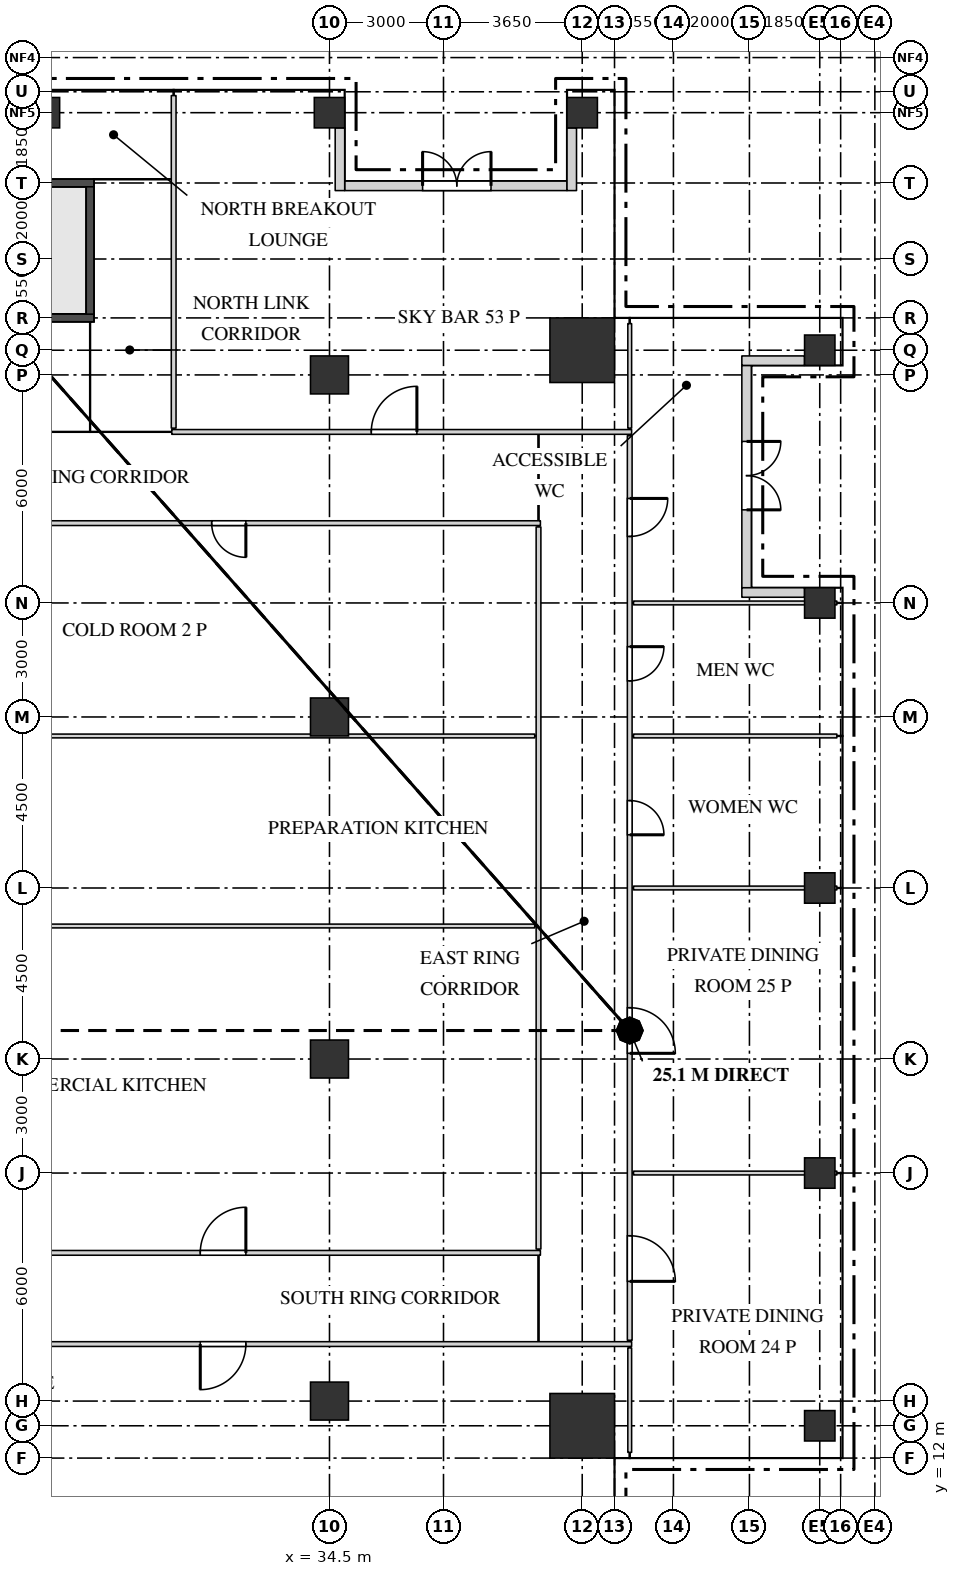
"""IFC4 building model, lengths in metres.
Left out: names, types, materials, properties, quantities, classifications, styles, units other than length and angle.
Written with IfcOpenShell. Run it as: python <this file> out.ifc"""

import sys

from ifc_helpers import new_model, si_unit, direction, frame, frame_2d, origin, origin_2d, place, context, subcontext, project, spatial, rectangle, extrude, source, transform, mapped, element, fill, save


model = new_model("IFC4")
c1 = context("Model", 3, precision=1e-05, world=origin(), true_north=direction((0.0, 1.0)))
c2 = subcontext(c1, "Body", "Model", "MODEL_VIEW")
j1 = project(units=[si_unit("LENGTHUNIT", "METRE"), si_unit("PLANEANGLEUNIT", "RADIAN")], contexts=[c1])
p1 = place(None, origin())
s1 = spatial("IfcSite", under=j1, at=p1, CompositionType="ELEMENT")
p2 = place(p1, origin())
s2 = spatial("IfcBuilding", under=s1, at=p2, CompositionType="ELEMENT")
p3 = place(p2, frame((0.0, 0.0, 306.2)))
s3 = spatial("IfcBuildingStorey", under=s2, at=p3, CompositionType="ELEMENT", Elevation=306.2)
m1 = source(origin(), c2, "Body", "SweptSolid", [
    extrude(rectangle(XDim=7.1, YDim=0.2, at=frame_2d((3.55, 0.0))), origin(), (0.0, 0.0, 1.0), 3.75),
])
p4 = place(p3, frame((21.2, 45.55, 0.0), z_axis=(0.0, 0.0, 1.0), x_axis=(1.0, 0.0, 0.0)))
e1 = element("IfcWall", 1, at=p4, inside=s3, PredefinedType="SHEAR", context=c2, shape_type="MappedRepresentation", body=[
    mapped(m1, transform((0.0, 0.0, 0.0))),
])
m2 = source(origin(), c2, "Body", "SweptSolid", [
    extrude(rectangle(XDim=1.2, YDim=2.1, at=frame_2d((0.6, 1.05))), frame((0.0, 0.11, 0.0), z_axis=(0.0, -1.0, 0.0), x_axis=(1.0, 0.0, 0.0)), (0.0, 0.0, 1.0), 0.22),
])
p5 = place(p4, frame((0.15, 0.0, 0.0)))
e2 = element("IfcOpeningElement", 2, at=p5, cuts=e1, PredefinedType="OPENING", context=c2, shape_type="MappedRepresentation", body=[
    mapped(m2, transform((0.0, 0.0, 0.0))),
])
p6 = place(p3, frame((21.2, 42.0, 0.0), z_axis=(0.0, 0.0, 1.0), x_axis=(1.0, 0.0, 0.0)))
e3 = element("IfcWall", 3, at=p6, inside=s3, PredefinedType="SHEAR", context=c2, shape_type="MappedRepresentation", body=[
    mapped(m1, transform((0.0, 0.0, 0.0))),
])
m3 = source(origin(), c2, "Body", "SweptSolid", [
    extrude(rectangle(XDim=3.35, YDim=0.2, at=frame_2d((1.675, 0.0))), origin(), (0.0, 0.0, 1.0), 3.75),
])
p7 = place(p3, frame((28.2, 42.1, 0.0), z_axis=(0.0, 0.0, 1.0), x_axis=(0.0, 1.0, 0.0)))
e4 = element("IfcWall", 4, at=p7, inside=s3, PredefinedType="SHEAR", context=c2, shape_type="MappedRepresentation", body=[
    mapped(m3, transform((0.0, 0.0, 0.0))),
])
m4 = source(origin(), c2, "Body", "SweptSolid", [
    extrude(rectangle(XDim=1.7, YDim=1.7, at=origin_2d()), origin(), (0.0, 0.0, 1.0), 3.75),
])
for number, where, z_axis, x_axis in (
    (5, (41.15, 41.15, 0.0), (0.0, 0.0, 1.0), (1.0, 0.0, 0.0)),
    (6, (41.15, 12.85, 0.0), (0.0, 0.0, 1.0), (1.0, 0.0, 0.0)),
):
    element("IfcColumn", number, at=place(p3, frame(where, z_axis=z_axis, x_axis=x_axis)), inside=s3, PredefinedType="COLUMN", context=c2, shape_type="MappedRepresentation", body=[
        mapped(m4, transform((0.0, 0.0, 0.0))),
    ])
m5 = source(origin(), c2, "Body", "SweptSolid", [
    extrude(rectangle(XDim=0.8, YDim=0.8, at=origin_2d()), origin(), (0.0, 0.0, 1.0), 3.75),
])
for number, where, z_axis, x_axis in (
    (7, (47.4, 12.85, 0.0), (0.0, 0.0, 1.0), (1.0, 0.0, 0.0)),
    (8, (47.4, 19.5, 0.0), (0.0, 0.0, 1.0), (1.0, 0.0, 0.0)),
    (9, (47.4, 27.0, 0.0), (0.0, 0.0, 1.0), (1.0, 0.0, 0.0)),
    (10, (47.4, 34.5, 0.0), (0.0, 0.0, 1.0), (1.0, 0.0, 0.0)),
    (11, (47.4, 41.15, 0.0), (0.0, 0.0, 1.0), (1.0, 0.0, 0.0)),
    (12, (27.0, 47.4, 0.0), (0.0, 0.0, 1.0), (1.0, 0.0, 0.0)),
    (13, (34.5, 47.4, 0.0), (0.0, 0.0, 1.0), (1.0, 0.0, 0.0)),
    (14, (41.15, 47.4, 0.0), (0.0, 0.0, 1.0), (1.0, 0.0, 0.0)),
):
    element("IfcColumn", number, at=place(p3, frame(where, z_axis=z_axis, x_axis=x_axis)), inside=s3, PredefinedType="COLUMN", context=c2, shape_type="MappedRepresentation", body=[
        mapped(m5, transform((0.0, 0.0, 0.0))),
    ])
m6 = source(origin(), c2, "Body", "SweptSolid", [
    extrude(rectangle(XDim=1.0, YDim=1.0, at=origin_2d()), origin(), (0.0, 0.0, 1.0), 3.75),
])
for number, where, z_axis, x_axis in (
    (15, (34.5, 13.5, 0.0), (0.0, 0.0, 1.0), (1.0, 0.0, 0.0)),
    (16, (34.5, 22.5, 0.0), (0.0, 0.0, 1.0), (1.0, 0.0, 0.0)),
    (17, (34.5, 31.5, 0.0), (0.0, 0.0, 1.0), (1.0, 0.0, 0.0)),
    (18, (34.5, 40.5, 0.0), (0.0, 0.0, 1.0), (1.0, 0.0, 0.0)),
):
    element("IfcColumn", number, at=place(p3, frame(where, z_axis=z_axis, x_axis=x_axis)), inside=s3, PredefinedType="COLUMN", context=c2, shape_type="MappedRepresentation", body=[
        mapped(m6, transform((0.0, 0.0, 0.0))),
    ])
m7 = source(origin(), c2, "Body", "SweptSolid", [
    extrude(rectangle(XDim=5.85, YDim=0.25, at=frame_2d((2.925, 0.0))), origin(), (0.0, 0.0, 1.0), 3.75),
])
p8 = place(p3, frame((45.475, 34.9, 0.0), z_axis=(0.0, 0.0, 1.0), x_axis=(0.0, 1.0, 0.0)))
e19 = element("IfcWall", 19, at=p8, inside=s3, PredefinedType="SOLIDWALL", context=c2, shape_type="MappedRepresentation", body=[
    mapped(m7, transform((0.0, 0.0, 0.0))),
])
m8 = source(origin(), c2, "Body", "SweptSolid", [
    extrude(rectangle(XDim=1.4, YDim=2.4, at=frame_2d((0.7, 1.2))), frame((0.0, 0.135, 0.0), z_axis=(0.0, -1.0, 0.0), x_axis=(1.0, 0.0, 0.0)), (0.0, 0.0, 1.0), 0.27),
])
p9 = place(p8, frame((0.35, 0.0, 0.0)))
e20 = element("IfcOpeningElement", 20, at=p9, cuts=e19, PredefinedType="OPENING", context=c2, shape_type="MappedRepresentation", body=[
    mapped(m8, transform((0.0, 0.0, 0.0))),
])
p10 = place(p8, frame((4.15, 0.0, 0.0)))
e21 = element("IfcOpeningElement", 21, at=p10, cuts=e19, PredefinedType="OPENING", context=c2, shape_type="MappedRepresentation", body=[
    mapped(m8, transform((0.0, 0.0, 0.0))),
])
m9 = source(origin(), c2, "Body", "SweptSolid", [
    extrude(rectangle(XDim=1.8, YDim=2.4, at=frame_2d((0.9, 1.2))), frame((0.0, 0.135, 0.0), z_axis=(0.0, -1.0, 0.0), x_axis=(1.0, 0.0, 0.0)), (0.0, 0.0, 1.0), 0.27),
])
p11 = place(p8, frame((2.05, 0.0, 0.0)))
e22 = element("IfcOpeningElement", 22, at=p11, cuts=e19, PredefinedType="OPENING", context=c2, shape_type="MappedRepresentation", body=[
    mapped(m9, transform((0.0, 0.0, 0.0))),
])
m10 = source(origin(), c2, "Body", "SweptSolid", [
    extrude(rectangle(XDim=1.65, YDim=0.25, at=frame_2d((0.825, 0.0))), origin(), (0.0, 0.0, 1.0), 3.45),
])
for number, where, z_axis, x_axis in (
    (23, (47.0, 34.775, 0.0), (0.0, 0.0, 1.0), (-1.0, 0.0, 0.0)),
    (24, (47.0, 40.875, 0.0), (0.0, 0.0, 1.0), (-1.0, 0.0, 0.0)),
):
    element("IfcWall", number, at=place(p3, frame(where, z_axis=z_axis, x_axis=x_axis)), inside=s3, PredefinedType="SOLIDWALL", context=c2, shape_type="MappedRepresentation", body=[
        mapped(m10, transform((0.0, 0.0, 0.0))),
    ])
p12 = place(p3, frame((34.9, 45.475, 0.0), z_axis=(0.0, 0.0, 1.0), x_axis=(1.0, 0.0, 0.0)))
e25 = element("IfcWall", 25, at=p12, inside=s3, PredefinedType="SOLIDWALL", context=c2, shape_type="MappedRepresentation", body=[
    mapped(m7, transform((0.0, 0.0, 0.0))),
])
p13 = place(p12, frame((0.35, 0.0, 0.0)))
e26 = element("IfcOpeningElement", 26, at=p13, cuts=e25, PredefinedType="OPENING", context=c2, shape_type="MappedRepresentation", body=[
    mapped(m8, transform((0.0, 0.0, 0.0))),
])
p14 = place(p12, frame((4.15, 0.0, 0.0)))
e27 = element("IfcOpeningElement", 27, at=p14, cuts=e25, PredefinedType="OPENING", context=c2, shape_type="MappedRepresentation", body=[
    mapped(m8, transform((0.0, 0.0, 0.0))),
])
p15 = place(p12, frame((2.05, 0.0, 0.0)))
e28 = element("IfcOpeningElement", 28, at=p15, cuts=e25, PredefinedType="OPENING", context=c2, shape_type="MappedRepresentation", body=[
    mapped(m9, transform((0.0, 0.0, 0.0))),
])
for number, where, z_axis, x_axis in (
    (29, (34.775, 47.0, 0.0), (0.0, 0.0, 1.0), (0.0, -1.0, 0.0)),
    (30, (40.875, 47.0, 0.0), (0.0, 0.0, 1.0), (0.0, -1.0, 0.0)),
):
    element("IfcWall", number, at=place(p3, frame(where, z_axis=z_axis, x_axis=x_axis)), inside=s3, PredefinedType="SOLIDWALL", context=c2, shape_type="MappedRepresentation", body=[
        mapped(m10, transform((0.0, 0.0, 0.0))),
    ])
m11 = source(origin(), c2, "Body", "SweptSolid", [
    extrude(rectangle(XDim=2.75, YDim=0.1, at=frame_2d((1.375, 0.0))), origin(), (0.0, 0.0, 1.0), 3.8),
])
p16 = place(p3, frame((42.4, 12.15, 0.0), z_axis=(0.0, 0.0, 1.0), x_axis=(0.0, 1.0, 0.0)))
e31 = element("IfcWall", 31, at=p16, inside=s3, PredefinedType="PARTITIONING", context=c2, shape_type="MappedRepresentation", body=[
    mapped(m11, transform((0.0, 0.0, 0.0))),
])
m12 = source(origin(), c2, "Body", "SweptSolid", [
    extrude(rectangle(XDim=19.1, YDim=0.125, at=frame_2d((9.55, 0.0))), origin(), (0.0, 0.0, 1.0), 3.8),
])
p17 = place(p3, frame((23.35, 15.0, 0.0), z_axis=(0.0, 0.0, 1.0), x_axis=(1.0, 0.0, 0.0)))
e32 = element("IfcWall", 32, at=p17, inside=s3, PredefinedType="PARTITIONING", context=c2, shape_type="MappedRepresentation", body=[
    mapped(m12, transform((0.0, 0.0, 0.0))),
])
m13 = source(origin(), c2, "Body", "SweptSolid", [
    extrude(rectangle(XDim=1.2, YDim=2.1, at=frame_2d((0.6, 1.05))), frame((0.0, 0.073, 0.0), z_axis=(0.0, -1.0, 0.0), x_axis=(1.0, 0.0, 0.0)), (0.0, 0.0, 1.0), 0.145),
])
p18 = place(p17, frame((7.75, 0.0, 0.0)))
e33 = element("IfcOpeningElement", 33, at=p18, cuts=e32, PredefinedType="OPENING", context=c2, shape_type="MappedRepresentation", body=[
    mapped(m13, transform((0.0, 0.0, 0.0))),
])
m14 = source(origin(), c2, "Body", "SweptSolid", [
    extrude(rectangle(XDim=23.8, YDim=0.125, at=frame_2d((11.9, 0.0))), origin(), (0.0, 0.0, 1.0), 3.8),
])
p19 = place(p3, frame((42.4, 15.1, 0.0), z_axis=(0.0, 0.0, 1.0), x_axis=(0.0, 1.0, 0.0)))
e34 = element("IfcWall", 34, at=p19, inside=s3, PredefinedType="PARTITIONING", context=c2, shape_type="MappedRepresentation", body=[
    mapped(m14, transform((0.0, 0.0, 0.0))),
])
p20 = place(p19, frame((1.55, 0.0, 0.0)))
e35 = element("IfcOpeningElement", 35, at=p20, cuts=e34, PredefinedType="OPENING", context=c2, shape_type="MappedRepresentation", body=[
    mapped(m13, transform((0.0, 0.0, 0.0))),
])
p21 = place(p19, frame((7.55, 0.0, 0.0)))
e36 = element("IfcOpeningElement", 36, at=p21, cuts=e34, PredefinedType="OPENING", context=c2, shape_type="MappedRepresentation", body=[
    mapped(m13, transform((0.0, 0.0, 0.0))),
])
m15 = source(origin(), c2, "Body", "SweptSolid", [
    extrude(rectangle(XDim=0.9, YDim=2.1, at=frame_2d((0.45, 1.05))), frame((0.0, 0.073, 0.0), z_axis=(0.0, -1.0, 0.0), x_axis=(1.0, 0.0, 0.0)), (0.0, 0.0, 1.0), 0.145),
])
p22 = place(p19, frame((13.3, 0.0, 0.0)))
e37 = element("IfcOpeningElement", 37, at=p22, cuts=e34, PredefinedType="OPENING", context=c2, shape_type="MappedRepresentation", body=[
    mapped(m15, transform((0.0, 0.0, 0.0))),
])
p23 = place(p19, frame((17.35, 0.0, 0.0)))
e38 = element("IfcOpeningElement", 38, at=p23, cuts=e34, PredefinedType="OPENING", context=c2, shape_type="MappedRepresentation", body=[
    mapped(m15, transform((0.0, 0.0, 0.0))),
])
m16 = source(origin(), c2, "Body", "SweptSolid", [
    extrude(rectangle(XDim=1.0, YDim=2.1, at=frame_2d((0.5, 1.05))), frame((0.0, 0.073, 0.0), z_axis=(0.0, -1.0, 0.0), x_axis=(1.0, 0.0, 0.0)), (0.0, 0.0, 1.0), 0.145),
])
p24 = place(p19, frame((21.15, 0.0, 0.0)))
e39 = element("IfcOpeningElement", 39, at=p24, cuts=e34, PredefinedType="OPENING", context=c2, shape_type="MappedRepresentation", body=[
    mapped(m16, transform((0.0, 0.0, 0.0))),
])
m17 = source(origin(), c2, "Body", "SweptSolid", [
    extrude(rectangle(XDim=16.7, YDim=0.125, at=frame_2d((8.35, 0.0))), origin(), (0.0, 0.0, 1.0), 3.8),
])
p25 = place(p3, frame((23.35, 17.4, 0.0), z_axis=(0.0, 0.0, 1.0), x_axis=(1.0, 0.0, 0.0)))
e40 = element("IfcWall", 40, at=p25, inside=s3, PredefinedType="PARTITIONING", context=c2, shape_type="MappedRepresentation", body=[
    mapped(m17, transform((0.0, 0.0, 0.0))),
])
p26 = place(p25, frame((7.75, 0.0, 0.0)))
e41 = element("IfcOpeningElement", 41, at=p26, cuts=e40, PredefinedType="OPENING", context=c2, shape_type="MappedRepresentation", body=[
    mapped(m13, transform((0.0, 0.0, 0.0))),
])
m18 = source(origin(), c2, "Body", "SweptSolid", [
    extrude(rectangle(XDim=19.0, YDim=0.125, at=frame_2d((9.5, 0.0))), origin(), (0.0, 0.0, 1.0), 3.8),
])
p27 = place(p3, frame((40.0, 17.5, 0.0), z_axis=(0.0, 0.0, 1.0), x_axis=(0.0, 1.0, 0.0)))
e42 = element("IfcWall", 42, at=p27, inside=s3, PredefinedType="PARTITIONING", context=c2, shape_type="MappedRepresentation", body=[
    mapped(m18, transform((0.0, 0.0, 0.0))),
])
m19 = source(origin(), c2, "Body", "SweptSolid", [
    extrude(rectangle(XDim=5.35, YDim=0.1, at=frame_2d((2.675, 0.0))), origin(), (0.0, 0.0, 1.0), 3.8),
])
p28 = place(p3, frame((42.5, 19.5, 0.0), z_axis=(0.0, 0.0, 1.0), x_axis=(1.0, 0.0, 0.0)))
e43 = element("IfcWall", 43, at=p28, inside=s3, PredefinedType="PARTITIONING", context=c2, shape_type="MappedRepresentation", body=[
    mapped(m19, transform((0.0, 0.0, 0.0))),
])
m20 = source(origin(), c2, "Body", "SweptSolid", [
    extrude(rectangle(XDim=16.4, YDim=0.1, at=frame_2d((8.2, 0.0))), origin(), (0.0, 0.0, 1.0), 3.8),
])
p29 = place(p3, frame((23.5, 26.0, 0.0), z_axis=(0.0, 0.0, 1.0), x_axis=(1.0, 0.0, 0.0)))
e44 = element("IfcWall", 44, at=p29, inside=s3, PredefinedType="PARTITIONING", context=c2, shape_type="MappedRepresentation", body=[
    mapped(m20, transform((0.0, 0.0, 0.0))),
])
p30 = place(p3, frame((42.5, 27.0, 0.0), z_axis=(0.0, 0.0, 1.0), x_axis=(1.0, 0.0, 0.0)))
e45 = element("IfcWall", 45, at=p30, inside=s3, PredefinedType="PARTITIONING", context=c2, shape_type="MappedRepresentation", body=[
    mapped(m19, transform((0.0, 0.0, 0.0))),
])
p31 = place(p3, frame((23.5, 31.0, 0.0), z_axis=(0.0, 0.0, 1.0), x_axis=(1.0, 0.0, 0.0)))
e46 = element("IfcWall", 46, at=p31, inside=s3, PredefinedType="PARTITIONING", context=c2, shape_type="MappedRepresentation", body=[
    mapped(m20, transform((0.0, 0.0, 0.0))),
])
for number, where, z_axis, x_axis in (
    (47, (42.5, 31.0, 0.0), (0.0, 0.0, 1.0), (1.0, 0.0, 0.0)),
    (48, (42.5, 34.5, 0.0), (0.0, 0.0, 1.0), (1.0, 0.0, 0.0)),
):
    element("IfcWall", number, at=place(p3, frame(where, z_axis=z_axis, x_axis=x_axis)), inside=s3, PredefinedType="PARTITIONING", context=c2, shape_type="MappedRepresentation", body=[
        mapped(m19, transform((0.0, 0.0, 0.0))),
    ])
p32 = place(p3, frame((23.35, 36.6, 0.0), z_axis=(0.0, 0.0, 1.0), x_axis=(1.0, 0.0, 0.0)))
e49 = element("IfcWall", 49, at=p32, inside=s3, PredefinedType="PARTITIONING", context=c2, shape_type="MappedRepresentation", body=[
    mapped(m17, transform((0.0, 0.0, 0.0))),
])
p33 = place(p32, frame((8.05, 0.0, 0.0)))
e50 = element("IfcOpeningElement", 50, at=p33, cuts=e49, PredefinedType="OPENING", context=c2, shape_type="MappedRepresentation", body=[
    mapped(m15, transform((0.0, 0.0, 0.0))),
])
m21 = source(origin(), c2, "Body", "SweptSolid", [
    extrude(rectangle(XDim=12.1, YDim=0.125, at=frame_2d((6.05, 0.0))), origin(), (0.0, 0.0, 1.0), 3.8),
])
p34 = place(p3, frame((30.35, 39.0, 0.0), z_axis=(0.0, 0.0, 1.0), x_axis=(1.0, 0.0, 0.0)))
e51 = element("IfcWall", 51, at=p34, inside=s3, PredefinedType="PARTITIONING", context=c2, shape_type="MappedRepresentation", body=[
    mapped(m21, transform((0.0, 0.0, 0.0))),
])
p35 = place(p34, frame((5.25, 0.0, 0.0)))
e52 = element("IfcOpeningElement", 52, at=p35, cuts=e51, PredefinedType="OPENING", context=c2, shape_type="MappedRepresentation", body=[
    mapped(m13, transform((0.0, 0.0, 0.0))),
])
m22 = source(origin(), c2, "Body", "SweptSolid", [
    extrude(rectangle(XDim=8.75, YDim=0.125, at=frame_2d((4.375, 0.0))), origin(), (0.0, 0.0, 1.0), 3.8),
])
p36 = place(p3, frame((30.4, 39.1, 0.0), z_axis=(0.0, 0.0, 1.0), x_axis=(0.0, 1.0, 0.0)))
e53 = element("IfcWall", 53, at=p36, inside=s3, PredefinedType="PARTITIONING", context=c2, shape_type="MappedRepresentation", body=[
    mapped(m22, transform((0.0, 0.0, 0.0))),
])
p37 = place(p3, frame((42.4, 39.1, 0.0), z_axis=(0.0, 0.0, 1.0), x_axis=(0.0, 1.0, 0.0)))
e54 = element("IfcWall", 54, at=p37, inside=s3, PredefinedType="PARTITIONING", context=c2, shape_type="MappedRepresentation", body=[
    mapped(m11, transform((0.0, 0.0, 0.0))),
])
m23 = source(origin(), c2, "Body", "SweptSolid", [
    extrude(rectangle(XDim=1.4, YDim=2.4, at=frame_2d((0.7, 1.2))), frame((0.0, 0.03, 0.0), z_axis=(0.0, -1.0, 0.0), x_axis=(1.0, 0.0, 0.0)), (0.0, 0.0, 1.0), 0.06),
])
p38 = place(p9, origin())
e55 = element("IfcWindow", 55, at=p38, inside=s3, PartitioningType="SINGLE_PANEL", PredefinedType="WINDOW", context=c2, shape_type="MappedRepresentation", body=[
    mapped(m23, transform((0.0, 0.0, 0.0))),
])
fill(e20, e55)
p39 = place(p10, origin())
e56 = element("IfcWindow", 56, at=p39, inside=s3, PartitioningType="SINGLE_PANEL", PredefinedType="WINDOW", context=c2, shape_type="MappedRepresentation", body=[
    mapped(m23, transform((0.0, 0.0, 0.0))),
])
fill(e21, e56)
m24 = source(origin(), c2, "Body", "SweptSolid", [
    extrude(rectangle(XDim=1.8, YDim=2.4, at=frame_2d((0.9, 1.2))), frame((0.0, 0.025, 0.0), z_axis=(0.0, -1.0, 0.0), x_axis=(1.0, 0.0, 0.0)), (0.0, 0.0, 1.0), 0.05),
])
p40 = place(p11, origin())
e57 = element("IfcDoor", 57, at=p40, inside=s3, OperationType="DOUBLE_DOOR_DOUBLE_SWING", PredefinedType="DOOR", context=c2, shape_type="MappedRepresentation", body=[
    mapped(m24, transform((0.0, 0.0, 0.0))),
])
fill(e22, e57)
p41 = place(p13, origin())
e58 = element("IfcWindow", 58, at=p41, inside=s3, PartitioningType="SINGLE_PANEL", PredefinedType="WINDOW", context=c2, shape_type="MappedRepresentation", body=[
    mapped(m23, transform((0.0, 0.0, 0.0))),
])
fill(e26, e58)
p42 = place(p14, origin())
e59 = element("IfcWindow", 59, at=p42, inside=s3, PartitioningType="SINGLE_PANEL", PredefinedType="WINDOW", context=c2, shape_type="MappedRepresentation", body=[
    mapped(m23, transform((0.0, 0.0, 0.0))),
])
fill(e27, e59)
p43 = place(p15, origin())
e60 = element("IfcDoor", 60, at=p43, inside=s3, OperationType="DOUBLE_DOOR_DOUBLE_SWING", PredefinedType="DOOR", context=c2, shape_type="MappedRepresentation", body=[
    mapped(m24, transform((0.0, 0.0, 0.0))),
])
fill(e28, e60)
m25 = source(origin(), c2, "Body", "SweptSolid", [
    extrude(rectangle(XDim=1.2, YDim=2.1, at=frame_2d((0.6, 1.05))), frame((0.0, 0.025, 0.0), z_axis=(0.0, -1.0, 0.0), x_axis=(1.0, 0.0, 0.0)), (0.0, 0.0, 1.0), 0.05),
])
p44 = place(p18, origin())
e61 = element("IfcDoor", 61, at=p44, inside=s3, OperationType="SINGLE_SWING_LEFT", PredefinedType="DOOR", context=c2, shape_type="MappedRepresentation", body=[
    mapped(m25, transform((0.0, 0.0, 0.0))),
])
fill(e33, e61)
p45 = place(p20, origin())
e62 = element("IfcDoor", 62, at=p45, inside=s3, OperationType="SINGLE_SWING_LEFT", PredefinedType="DOOR", context=c2, shape_type="MappedRepresentation", body=[
    mapped(m25, transform((0.0, 0.0, 0.0))),
])
fill(e35, e62)
p46 = place(p21, origin())
e63 = element("IfcDoor", 63, at=p46, inside=s3, OperationType="SINGLE_SWING_LEFT", PredefinedType="DOOR", context=c2, shape_type="MappedRepresentation", body=[
    mapped(m25, transform((0.0, 0.0, 0.0))),
])
fill(e36, e63)
m26 = source(origin(), c2, "Body", "SweptSolid", [
    extrude(rectangle(XDim=0.9, YDim=2.1, at=frame_2d((0.45, 1.05))), frame((0.0, 0.025, 0.0), z_axis=(0.0, -1.0, 0.0), x_axis=(1.0, 0.0, 0.0)), (0.0, 0.0, 1.0), 0.05),
])
p47 = place(p22, origin())
e64 = element("IfcDoor", 64, at=p47, inside=s3, OperationType="SINGLE_SWING_LEFT", PredefinedType="DOOR", context=c2, shape_type="MappedRepresentation", body=[
    mapped(m26, transform((0.0, 0.0, 0.0))),
])
fill(e37, e64)
p48 = place(p23, origin())
e65 = element("IfcDoor", 65, at=p48, inside=s3, OperationType="SINGLE_SWING_RIGHT", PredefinedType="DOOR", context=c2, shape_type="MappedRepresentation", body=[
    mapped(m26, transform((0.0, 0.0, 0.0))),
])
fill(e38, e65)
m27 = source(origin(), c2, "Body", "SweptSolid", [
    extrude(rectangle(XDim=1.0, YDim=2.1, at=frame_2d((0.5, 1.05))), frame((0.0, 0.025, 0.0), z_axis=(0.0, -1.0, 0.0), x_axis=(1.0, 0.0, 0.0)), (0.0, 0.0, 1.0), 0.05),
])
p49 = place(p24, origin())
e66 = element("IfcDoor", 66, at=p49, inside=s3, OperationType="SINGLE_SWING_RIGHT", PredefinedType="DOOR", context=c2, shape_type="MappedRepresentation", body=[
    mapped(m27, transform((0.0, 0.0, 0.0))),
])
fill(e39, e66)
p50 = place(p35, origin())
e67 = element("IfcDoor", 67, at=p50, inside=s3, OperationType="SINGLE_SWING_LEFT", PredefinedType="DOOR", context=c2, shape_type="MappedRepresentation", body=[
    mapped(m25, transform((0.0, 0.0, 0.0))),
])
fill(e52, e67)
p51 = place(p26, origin())
e68 = element("IfcDoor", 68, at=p51, inside=s3, OperationType="SINGLE_SWING_LEFT", PredefinedType="DOOR", context=c2, shape_type="MappedRepresentation", body=[
    mapped(m25, transform((0.0, 0.0, 0.0))),
])
fill(e41, e68)
p52 = place(p33, origin())
e69 = element("IfcDoor", 69, at=p52, inside=s3, OperationType="SINGLE_SWING_RIGHT", PredefinedType="DOOR", context=c2, shape_type="MappedRepresentation", body=[
    mapped(m26, transform((0.0, 0.0, 0.0))),
])
fill(e50, e69)
save(model, sys.argv[1])
